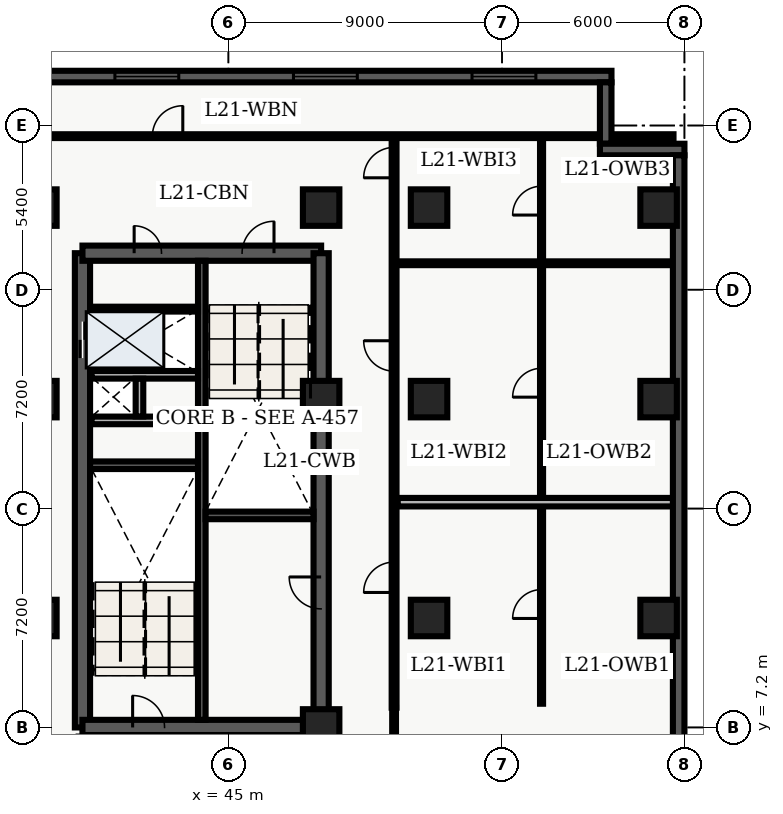
"""IFC4 building model, lengths in metres.
Left out: names, types, materials, properties, quantities, classifications, styles, units other than length and angle.
Written with IfcOpenShell. Run it as: python <this file> out.ifc"""

import sys

from ifc_helpers import new_model, entity, si_unit, converted_unit, direction, frame, origin_with_axes, origin_2d_with_axis, place, context, subcontext, project, spatial, polyline, rectangle, outline, extrude, element, fill, save


model = new_model("IFC4")
c1 = context("Model", 3, precision=1e-05, world=origin_with_axes(), true_north=direction((0.0, 1.0)))
c2 = subcontext(c1, "Body", "Model", "MODEL_VIEW")
j1 = project(units=[si_unit("LENGTHUNIT", "METRE"), converted_unit("PLANEANGLEUNIT", "DEGREE", entity("IfcPlaneAngleMeasure", 0.017), si_unit("PLANEANGLEUNIT", "RADIAN"), dimensions=[0, 0, 0, 0, 0, 0, 0])], contexts=[c1])
p1 = place(None, origin_with_axes())
s1 = spatial("IfcSite", under=j1, at=p1, CompositionType="ELEMENT")
p2 = place(p1, origin_with_axes())
s2 = spatial("IfcBuilding", under=s1, at=p2, CompositionType="ELEMENT")
p3 = place(p2, frame((0.0, 0.0, 89.1), z_axis=(0.0, 0.0, 1.0), x_axis=(1.0, 0.0, 0.0)))
s3 = spatial("IfcBuildingStorey", under=s2, at=p3, CompositionType="ELEMENT", Elevation=89.1)
p4 = place(p3, frame((40.2, 7.2, 0.0), z_axis=(0.0, 0.0, 1.0), x_axis=(0.0, 1.0, 0.0)))
e1 = element("IfcWall", 1, at=p4, inside=s3, PredefinedType="SHEAR", context=c2, shape_type="SweptSolid", body=[
    extrude(outline(polyline([(0.0, -0.25), (15.6, -0.25), (15.6, 0.25), (0.0, 0.25), (0.0, -0.25)])), origin_with_axes(), (0.0, 0.0, 1.0), 3.66),
])
p5 = place(p4, frame((12.75, 0.0, 0.0), z_axis=(0.0, 0.0, 1.0), x_axis=(1.0, 0.0, 0.0)))
e2 = element("IfcOpeningElement", 2, at=p5, cuts=e1, PredefinedType="OPENING", context=c2, shape_type="SweptSolid", body=[
    extrude(rectangle(XDim=1.2, YDim=0.52, at=origin_2d_with_axis()), origin_with_axes(), (0.0, 0.0, 1.0), 2.15),
])
p6 = place(p3, frame((40.2, 7.2, 0.0), z_axis=(0.0, 0.0, 1.0), x_axis=(1.0, 0.0, 0.0)))
e3 = element("IfcWall", 3, at=p6, inside=s3, PredefinedType="SHEAR", context=c2, shape_type="SweptSolid", body=[
    extrude(outline(polyline([(0.0, -0.25), (7.85, -0.25), (7.85, 0.25), (0.0, 0.25), (0.0, -0.25)])), origin_with_axes(), (0.0, 0.0, 1.0), 3.66),
])
p7 = place(p6, frame((2.175, 0.0, 0.0), z_axis=(0.0, 0.0, 1.0), x_axis=(1.0, 0.0, 0.0)))
e4 = element("IfcOpeningElement", 4, at=p7, cuts=e3, PredefinedType="OPENING", context=c2, shape_type="SweptSolid", body=[
    extrude(rectangle(XDim=1.05, YDim=0.52, at=origin_2d_with_axis()), origin_with_axes(), (0.0, 0.0, 1.0), 2.15),
])
p8 = place(p3, frame((40.2, 22.8, 0.0), z_axis=(0.0, 0.0, 1.0), x_axis=(1.0, 0.0, 0.0)))
e5 = element("IfcWall", 5, at=p8, inside=s3, PredefinedType="SHEAR", context=c2, shape_type="SweptSolid", body=[
    extrude(outline(polyline([(0.0, -0.25), (7.85, -0.25), (7.85, 0.25), (0.0, 0.25), (0.0, -0.25)])), origin_with_axes(), (0.0, 0.0, 1.0), 3.66),
])
p9 = place(p8, frame((5.775, 0.0, 0.0), z_axis=(0.0, 0.0, 1.0), x_axis=(1.0, 0.0, 0.0)))
e6 = element("IfcOpeningElement", 6, at=p9, cuts=e5, PredefinedType="OPENING", context=c2, shape_type="SweptSolid", body=[
    extrude(rectangle(XDim=1.05, YDim=0.52, at=origin_2d_with_axis()), origin_with_axes(), (0.0, 0.0, 1.0), 2.15),
])
p10 = place(p8, frame((2.15, 0.0, 0.0), z_axis=(0.0, 0.0, 1.0), x_axis=(1.0, 0.0, 0.0)))
e7 = element("IfcOpeningElement", 7, at=p10, cuts=e5, PredefinedType="OPENING", context=c2, shape_type="SweptSolid", body=[
    extrude(rectangle(XDim=0.9, YDim=0.52, at=origin_2d_with_axis()), origin_with_axes(), (0.0, 0.0, 1.0), 2.15),
])
p11 = place(p3, frame((48.05, 7.2, 0.0), z_axis=(0.0, 0.0, 1.0), x_axis=(0.0, 1.0, 0.0)))
e8 = element("IfcWall", 8, at=p11, inside=s3, PredefinedType="SHEAR", context=c2, shape_type="SweptSolid", body=[
    extrude(outline(polyline([(0.0, -0.25), (15.6, -0.25), (15.6, 0.25), (0.0, 0.25), (0.0, -0.25)])), origin_with_axes(), (0.0, 0.0, 1.0), 3.66),
])
p12 = place(p11, frame((4.425, 0.0, 0.0), z_axis=(0.0, 0.0, 1.0), x_axis=(1.0, 0.0, 0.0)))
e9 = element("IfcOpeningElement", 9, at=p12, cuts=e8, PredefinedType="OPENING", context=c2, shape_type="SweptSolid", body=[
    extrude(rectangle(XDim=1.05, YDim=0.52, at=origin_2d_with_axis()), origin_with_axes(), (0.0, 0.0, 1.0), 2.15),
])
p13 = place(p3, frame((44.125, 7.45, 0.0), z_axis=(0.0, 0.0, 1.0), x_axis=(0.0, 1.0, 0.0)))
e10 = element("IfcWall", 10, at=p13, inside=s3, PredefinedType="SHEAR", context=c2, shape_type="SweptSolid", body=[
    extrude(outline(polyline([(0.0, -0.125), (15.1, -0.125), (15.1, 0.125), (0.0, 0.125), (0.0, -0.125)])), origin_with_axes(), (0.0, 0.0, 1.0), 3.66),
])
for number, where, z_axis, x_axis in (
    (11, (40.45, 15.825, 0.0), (0.0, 0.0, 1.0), (1.0, 0.0, 0.0)),
    (12, (44.25, 14.175, 0.0), (0.0, 0.0, 1.0), (1.0, 0.0, 0.0)),
):
    element("IfcWall", number, at=place(p3, frame(where, z_axis=z_axis, x_axis=x_axis)), inside=s3, PredefinedType="SHEAR", context=c2, shape_type="SweptSolid", body=[
        extrude(outline(polyline([(0.0, -0.125), (3.55, -0.125), (3.55, 0.125), (0.0, 0.125), (0.0, -0.125)])), origin_with_axes(), (0.0, 0.0, 1.0), 3.66),
    ])
for number, where, z_axis, x_axis in (
    (13, (40.5, 17.3, 0.0), (0.0, 0.0, 1.0), (1.0, 0.0, 0.0)),
    (14, (40.5, 18.8, 0.0), (0.0, 0.0, 1.0), (1.0, 0.0, 0.0)),
):
    element("IfcWall", number, at=place(p3, frame(where, z_axis=z_axis, x_axis=x_axis)), inside=s3, PredefinedType="SOLIDWALL", context=c2, shape_type="SweptSolid", body=[
        extrude(outline(polyline([(0.0, -0.125), (3.5, -0.125), (3.5, 0.125), (0.0, 0.125), (0.0, -0.125)])), origin_with_axes(), (0.0, 0.0, 1.0), 2.7),
    ])
p14 = place(p3, frame((42.075, 17.43, 0.0), z_axis=(0.0, 0.0, 1.0), x_axis=(0.0, 1.0, 0.0)))
e15 = element("IfcWall", 15, at=p14, inside=s3, PredefinedType="SOLIDWALL", context=c2, shape_type="SweptSolid", body=[
    extrude(outline(polyline([(0.0, -0.125), (1.24, -0.125), (1.24, 0.125), (0.0, 0.125), (0.0, -0.125)])), origin_with_axes(), (0.0, 0.0, 1.0), 2.7),
])
for number, where, z_axis, x_axis in (
    (16, (38.75, 10.8, 0.0), (0.0, 0.0, 1.0), (1.0, 0.0, 0.0)),
    (17, (38.75, 18.0, 0.0), (0.0, 0.0, 1.0), (1.0, 0.0, 0.0)),
    (18, (38.75, 24.3, 0.0), (0.0, 0.0, 1.0), (1.0, 0.0, 0.0)),
    (19, (48.05, 7.2, 0.0), (0.0, 0.0, 1.0), (1.0, 0.0, 0.0)),
    (20, (48.05, 18.0, 0.0), (0.0, 0.0, 1.0), (1.0, 0.0, 0.0)),
    (21, (48.05, 24.3, 0.0), (0.0, 0.0, 1.0), (1.0, 0.0, 0.0)),
    (22, (51.6, 10.8, 0.0), (0.0, 0.0, 1.0), (1.0, 0.0, 0.0)),
    (23, (51.6, 18.0, 0.0), (0.0, 0.0, 1.0), (1.0, 0.0, 0.0)),
    (24, (51.6, 24.3, 0.0), (0.0, 0.0, 1.0), (1.0, 0.0, 0.0)),
    (25, (59.15, 10.8, 0.0), (0.0, 0.0, 1.0), (1.0, 0.0, 0.0)),
    (26, (59.15, 18.0, 0.0), (0.0, 0.0, 1.0), (1.0, 0.0, 0.0)),
    (27, (59.15, 24.3, 0.0), (0.0, 0.0, 1.0), (1.0, 0.0, 0.0)),
):
    element("IfcColumn", number, at=place(p3, frame(where, z_axis=z_axis, x_axis=x_axis)), inside=s3, PredefinedType="COLUMN", context=c2, shape_type="SweptSolid", body=[
        extrude(rectangle(XDim=1.2, YDim=1.2, at=origin_2d_with_axis()), origin_with_axes(), (0.0, 0.0, 1.0), 3.9),
    ])
p15 = place(p3, frame((40.5, 20.96, 0.0), z_axis=(0.0, 0.0, 1.0), x_axis=(1.0, 0.0, 0.0)))
e28 = element("IfcWall", 28, at=p15, inside=s3, PredefinedType="PARTITIONING", context=c2, shape_type="SweptSolid", body=[
    extrude(outline(polyline([(0.0, -0.08), (3.5, -0.08), (3.5, 0.08), (0.0, 0.08), (0.0, -0.08)])), origin_with_axes(), (0.0, 0.0, 1.0), 2.7),
])
p16 = place(p3, frame((50.45, 7.85, 0.0), z_axis=(0.0, 0.0, 1.0), x_axis=(0.0, 1.0, 0.0)))
e29 = element("IfcWall", 29, at=p16, inside=s3, PredefinedType="PARTITIONING", context=c2, shape_type="SweptSolid", body=[
    extrude(outline(polyline([(0.0, -0.08), (18.8, -0.08), (18.8, 0.08), (0.0, 0.08), (0.0, -0.08)])), origin_with_axes(), (0.0, 0.0, 1.0), 2.7),
])
p17 = place(p16, frame((4.29, 0.0, 0.0), z_axis=(0.0, 0.0, 1.0), x_axis=(1.0, 0.0, 0.0)))
e30 = element("IfcOpeningElement", 30, at=p17, cuts=e29, PredefinedType="OPENING", context=c2, shape_type="SweptSolid", body=[
    extrude(rectangle(XDim=1.0, YDim=0.18, at=origin_2d_with_axis()), origin_with_axes(), (0.0, 0.0, 1.0), 2.15),
])
p18 = place(p16, frame((11.57, 0.0, 0.0), z_axis=(0.0, 0.0, 1.0), x_axis=(1.0, 0.0, 0.0)))
e31 = element("IfcOpeningElement", 31, at=p18, cuts=e29, PredefinedType="OPENING", context=c2, shape_type="SweptSolid", body=[
    extrude(rectangle(XDim=1.0, YDim=0.18, at=origin_2d_with_axis()), origin_with_axes(), (0.0, 0.0, 1.0), 2.15),
])
p19 = place(p16, frame((17.93, 0.0, 0.0), z_axis=(0.0, 0.0, 1.0), x_axis=(1.0, 0.0, 0.0)))
e32 = element("IfcOpeningElement", 32, at=p19, cuts=e29, PredefinedType="OPENING", context=c2, shape_type="SweptSolid", body=[
    extrude(rectangle(XDim=1.0, YDim=0.18, at=origin_2d_with_axis()), origin_with_axes(), (0.0, 0.0, 1.0), 2.15),
])
p20 = place(p3, frame((38.76, 26.65, 0.0), z_axis=(0.0, 0.0, 1.0), x_axis=(1.0, 0.0, 0.0)))
e33 = element("IfcWall", 33, at=p20, inside=s3, PredefinedType="PARTITIONING", context=c2, shape_type="SweptSolid", body=[
    extrude(outline(polyline([(0.0, -0.062), (20.88, -0.062), (20.88, 0.062), (0.0, 0.062), (0.0, -0.062)])), origin_with_axes(), (0.0, 0.0, 1.0), 2.7),
])
p21 = place(p20, frame((4.24, 0.0, 0.0), z_axis=(0.0, 0.0, 1.0), x_axis=(1.0, 0.0, 0.0)))
e34 = element("IfcOpeningElement", 34, at=p21, cuts=e33, PredefinedType="OPENING", context=c2, shape_type="SweptSolid", body=[
    extrude(rectangle(XDim=1.0, YDim=0.145, at=origin_2d_with_axis()), origin_with_axes(), (0.0, 0.0, 1.0), 2.15),
])
p22 = place(p3, frame((50.45, 0.36, 0.0), z_axis=(0.0, 0.0, 1.0), x_axis=(0.0, 1.0, 0.0)))
e35 = element("IfcWall", 35, at=p22, inside=s3, PredefinedType="PARTITIONING", context=c2, shape_type="SweptSolid", body=[
    extrude(outline(polyline([(0.0, -0.062), (7.49, -0.062), (7.49, 0.062), (0.0, 0.062), (0.0, -0.062)])), origin_with_axes(), (0.0, 0.0, 1.0), 2.7),
])
p23 = place(p22, frame((5.1, 0.0, 0.0), z_axis=(0.0, 0.0, 1.0), x_axis=(1.0, 0.0, 0.0)))
e36 = element("IfcOpeningElement", 36, at=p23, cuts=e35, PredefinedType="OPENING", context=c2, shape_type="SweptSolid", body=[
    extrude(rectangle(XDim=1.0, YDim=0.145, at=origin_2d_with_axis()), origin_with_axes(), (0.0, 0.0, 1.0), 2.15),
])
p24 = place(p3, frame((55.3, 7.98, 0.0), z_axis=(0.0, 0.0, 1.0), x_axis=(0.0, 1.0, 0.0)))
e37 = element("IfcWall", 37, at=p24, inside=s3, PredefinedType="PARTITIONING", context=c2, shape_type="SweptSolid", body=[
    extrude(outline(polyline([(0.0, -0.05), (18.54, -0.05), (18.54, 0.05), (0.0, 0.05), (0.0, -0.05)])), origin_with_axes(), (0.0, 0.0, 1.0), 2.7),
])
p25 = place(p24, frame((3.28, 0.0, 0.0), z_axis=(0.0, 0.0, 1.0), x_axis=(1.0, 0.0, 0.0)))
e38 = element("IfcOpeningElement", 38, at=p25, cuts=e37, PredefinedType="OPENING", context=c2, shape_type="SweptSolid", body=[
    extrude(rectangle(XDim=0.95, YDim=0.12, at=origin_2d_with_axis()), origin_with_axes(), (0.0, 0.0, 1.0), 2.15),
])
p26 = place(p24, frame((10.559, 0.0, 0.0), z_axis=(0.0, 0.0, 1.0), x_axis=(1.0, 0.0, 0.0)))
e39 = element("IfcOpeningElement", 39, at=p26, cuts=e37, PredefinedType="OPENING", context=c2, shape_type="SweptSolid", body=[
    extrude(rectangle(XDim=0.95, YDim=0.12, at=origin_2d_with_axis()), origin_with_axes(), (0.0, 0.0, 1.0), 2.15),
])
p27 = place(p24, frame((16.549, 0.0, 0.0), z_axis=(0.0, 0.0, 1.0), x_axis=(1.0, 0.0, 0.0)))
e40 = element("IfcOpeningElement", 40, at=p27, cuts=e37, PredefinedType="OPENING", context=c2, shape_type="SweptSolid", body=[
    extrude(rectangle(XDim=0.95, YDim=0.12, at=origin_2d_with_axis()), origin_with_axes(), (0.0, 0.0, 1.0), 2.15),
])
p28 = place(p3, frame((50.57, 14.61, 0.0), z_axis=(0.0, 0.0, 1.0), x_axis=(1.0, 0.0, 0.0)))
e41 = element("IfcWall", 41, at=p28, inside=s3, PredefinedType="PARTITIONING", context=c2, shape_type="SweptSolid", body=[
    extrude(outline(polyline([(0.0, -0.14), (9.055, -0.14), (9.055, 0.14), (0.0, 0.14), (0.0, -0.14)])), origin_with_axes(), (0.0, 0.0, 1.0), 2.7),
])
p29 = place(p3, frame((50.57, 22.469, 0.0), z_axis=(0.0, 0.0, 1.0), x_axis=(1.0, 0.0, 0.0)))
e42 = element("IfcWall", 42, at=p29, inside=s3, PredefinedType="PARTITIONING", context=c2, shape_type="SweptSolid", body=[
    extrude(outline(polyline([(0.0, -0.062), (9.055, -0.062), (9.055, 0.062), (0.0, 0.062), (0.0, -0.062)])), origin_with_axes(), (0.0, 0.0, 1.0), 2.7),
])
p30 = place(p3, frame((38.78, 28.61, 0.0), z_axis=(0.0, 0.0, 1.0), x_axis=(1.0, 0.0, 0.0)))
e43 = element("IfcWall", 43, at=p30, inside=s3, PredefinedType="SOLIDWALL", context=c2, shape_type="SweptSolid", body=[
    extrude(outline(polyline([(0.0, -0.19), (18.82, -0.19), (18.82, 0.19), (0.0, 0.19), (0.0, -0.19)])), origin_with_axes(), (0.0, 0.0, 1.0), 3.66),
])
p31 = place(p30, frame((3.537, 0.0, 0.45), z_axis=(0.0, 0.0, 1.0), x_axis=(1.0, 0.0, 0.0)))
e44 = element("IfcOpeningElement", 44, at=p31, cuts=e43, PredefinedType="OPENING", context=c2, shape_type="SweptSolid", body=[
    extrude(rectangle(XDim=2.1, YDim=0.4, at=origin_2d_with_axis()), origin_with_axes(), (0.0, 0.0, 1.0), 2.2),
])
p32 = place(p30, frame((9.41, 0.0, 0.45), z_axis=(0.0, 0.0, 1.0), x_axis=(1.0, 0.0, 0.0)))
e45 = element("IfcOpeningElement", 45, at=p32, cuts=e43, PredefinedType="OPENING", context=c2, shape_type="SweptSolid", body=[
    extrude(rectangle(XDim=2.1, YDim=0.4, at=origin_2d_with_axis()), origin_with_axes(), (0.0, 0.0, 1.0), 2.2),
])
p33 = place(p30, frame((15.283, 0.0, 0.45), z_axis=(0.0, 0.0, 1.0), x_axis=(1.0, 0.0, 0.0)))
e46 = element("IfcOpeningElement", 46, at=p33, cuts=e43, PredefinedType="OPENING", context=c2, shape_type="SweptSolid", body=[
    extrude(rectangle(XDim=2.1, YDim=0.4, at=origin_2d_with_axis()), origin_with_axes(), (0.0, 0.0, 1.0), 2.2),
])
p34 = place(p3, frame((57.41, 28.42, 0.0), z_axis=(0.0, 0.0, 1.0), x_axis=(0.0, -1.0, 0.0)))
e47 = element("IfcWall", 47, at=p34, inside=s3, PredefinedType="SOLIDWALL", context=c2, shape_type="SweptSolid", body=[
    extrude(outline(polyline([(0.0, -0.19), (2.02, -0.19), (2.02, 0.19), (0.0, 0.19), (0.0, -0.19)])), origin_with_axes(), (0.0, 0.0, 1.0), 3.66),
])
p35 = place(p3, frame((57.22, 26.21, 0.0), z_axis=(0.0, 0.0, 1.0), x_axis=(1.0, 0.0, 0.0)))
e48 = element("IfcWall", 48, at=p35, inside=s3, PredefinedType="SOLIDWALL", context=c2, shape_type="SweptSolid", body=[
    extrude(outline(polyline([(0.0, -0.19), (2.78, -0.19), (2.78, 0.19), (0.0, 0.19), (0.0, -0.19)])), origin_with_axes(), (0.0, 0.0, 1.0), 3.66),
])
p36 = place(p3, frame((59.81, 26.02, 0.0), z_axis=(0.0, 0.0, 1.0), x_axis=(0.0, -1.0, 0.0)))
e49 = element("IfcWall", 49, at=p36, inside=s3, PredefinedType="SOLIDWALL", context=c2, shape_type="SweptSolid", body=[
    extrude(outline(polyline([(0.0, -0.19), (23.62, -0.19), (23.62, 0.19), (0.0, 0.19), (0.0, -0.19)])), origin_with_axes(), (0.0, 0.0, 1.0), 3.66),
])
p37 = place(p36, frame((20.218, 0.0, 0.45), z_axis=(0.0, 0.0, 1.0), x_axis=(1.0, 0.0, 0.0)))
e50 = element("IfcOpeningElement", 50, at=p37, cuts=e49, PredefinedType="OPENING", context=c2, shape_type="SweptSolid", body=[
    extrude(rectangle(XDim=2.1, YDim=0.4, at=origin_2d_with_axis()), origin_with_axes(), (0.0, 0.0, 1.0), 2.2),
])
p38 = place(p4, frame((12.75, 0.0, 0.0), z_axis=(0.0, 0.0, 1.0), x_axis=(1.0, 0.0, 0.0)))
e51 = element("IfcDoor", 51, at=p38, inside=s3, OperationType="DOUBLE_DOOR_SLIDING", PredefinedType="DOOR", context=c2, shape_type="SweptSolid", body=[
    extrude(rectangle(XDim=1.2, YDim=0.09, at=origin_2d_with_axis()), origin_with_axes(), (0.0, 0.0, 1.0), 2.15),
])
fill(e2, e51)
p39 = place(p6, frame((2.175, 0.0, 0.0), z_axis=(0.0, 0.0, 1.0), x_axis=(1.0, 0.0, 0.0)))
e52 = element("IfcDoor", 52, at=p39, inside=s3, OperationType="SINGLE_SWING_LEFT", PredefinedType="DOOR", context=c2, shape_type="SweptSolid", body=[
    extrude(rectangle(XDim=1.05, YDim=0.09, at=origin_2d_with_axis()), origin_with_axes(), (0.0, 0.0, 1.0), 2.15),
])
fill(e4, e52)
p40 = place(p8, frame((5.775, 0.0, 0.0), z_axis=(0.0, 0.0, 1.0), x_axis=(1.0, 0.0, 0.0)))
e53 = element("IfcDoor", 53, at=p40, inside=s3, OperationType="SINGLE_SWING_RIGHT", PredefinedType="DOOR", context=c2, shape_type="SweptSolid", body=[
    extrude(rectangle(XDim=1.05, YDim=0.09, at=origin_2d_with_axis()), origin_with_axes(), (0.0, 0.0, 1.0), 2.15),
])
fill(e6, e53)
p41 = place(p8, frame((2.15, 0.0, 0.0), z_axis=(0.0, 0.0, 1.0), x_axis=(1.0, 0.0, 0.0)))
e54 = element("IfcDoor", 54, at=p41, inside=s3, OperationType="SINGLE_SWING_LEFT", PredefinedType="DOOR", context=c2, shape_type="SweptSolid", body=[
    extrude(rectangle(XDim=0.9, YDim=0.09, at=origin_2d_with_axis()), origin_with_axes(), (0.0, 0.0, 1.0), 2.15),
])
fill(e7, e54)
p42 = place(p11, frame((4.425, 0.0, 0.0), z_axis=(0.0, 0.0, 1.0), x_axis=(1.0, 0.0, 0.0)))
e55 = element("IfcDoor", 55, at=p42, inside=s3, OperationType="SINGLE_SWING_RIGHT", PredefinedType="DOOR", context=c2, shape_type="SweptSolid", body=[
    extrude(rectangle(XDim=1.05, YDim=0.09, at=origin_2d_with_axis()), origin_with_axes(), (0.0, 0.0, 1.0), 2.15),
])
fill(e9, e55)
p43 = place(p20, frame((4.24, 0.0, 0.0), z_axis=(0.0, 0.0, 1.0), x_axis=(1.0, 0.0, 0.0)))
e56 = element("IfcDoor", 56, at=p43, inside=s3, OperationType="SINGLE_SWING_RIGHT", PredefinedType="DOOR", context=c2, shape_type="SweptSolid", body=[
    extrude(rectangle(XDim=1.0, YDim=0.075, at=origin_2d_with_axis()), origin_with_axes(), (0.0, 0.0, 1.0), 2.15),
])
fill(e34, e56)
p44 = place(p24, frame((3.28, 0.0, 0.0), z_axis=(0.0, 0.0, 1.0), x_axis=(1.0, 0.0, 0.0)))
e57 = element("IfcDoor", 57, at=p44, inside=s3, OperationType="SINGLE_SWING_LEFT", PredefinedType="DOOR", context=c2, shape_type="SweptSolid", body=[
    extrude(rectangle(XDim=0.95, YDim=0.06, at=origin_2d_with_axis()), origin_with_axes(), (0.0, 0.0, 1.0), 2.15),
])
fill(e38, e57)
p45 = place(p16, frame((4.29, 0.0, 0.0), z_axis=(0.0, 0.0, 1.0), x_axis=(1.0, 0.0, 0.0)))
e58 = element("IfcDoor", 58, at=p45, inside=s3, OperationType="SINGLE_SWING_LEFT", PredefinedType="DOOR", context=c2, shape_type="SweptSolid", body=[
    extrude(rectangle(XDim=1.0, YDim=0.09, at=origin_2d_with_axis()), origin_with_axes(), (0.0, 0.0, 1.0), 2.15),
])
fill(e30, e58)
p46 = place(p24, frame((10.559, 0.0, 0.0), z_axis=(0.0, 0.0, 1.0), x_axis=(1.0, 0.0, 0.0)))
e59 = element("IfcDoor", 59, at=p46, inside=s3, OperationType="SINGLE_SWING_LEFT", PredefinedType="DOOR", context=c2, shape_type="SweptSolid", body=[
    extrude(rectangle(XDim=0.95, YDim=0.06, at=origin_2d_with_axis()), origin_with_axes(), (0.0, 0.0, 1.0), 2.15),
])
fill(e39, e59)
p47 = place(p16, frame((11.57, 0.0, 0.0), z_axis=(0.0, 0.0, 1.0), x_axis=(1.0, 0.0, 0.0)))
e60 = element("IfcDoor", 60, at=p47, inside=s3, OperationType="SINGLE_SWING_RIGHT", PredefinedType="DOOR", context=c2, shape_type="SweptSolid", body=[
    extrude(rectangle(XDim=1.0, YDim=0.09, at=origin_2d_with_axis()), origin_with_axes(), (0.0, 0.0, 1.0), 2.15),
])
fill(e31, e60)
p48 = place(p24, frame((16.549, 0.0, 0.0), z_axis=(0.0, 0.0, 1.0), x_axis=(1.0, 0.0, 0.0)))
e61 = element("IfcDoor", 61, at=p48, inside=s3, OperationType="SINGLE_SWING_LEFT", PredefinedType="DOOR", context=c2, shape_type="SweptSolid", body=[
    extrude(rectangle(XDim=0.95, YDim=0.06, at=origin_2d_with_axis()), origin_with_axes(), (0.0, 0.0, 1.0), 2.15),
])
fill(e40, e61)
p49 = place(p16, frame((17.93, 0.0, 0.0), z_axis=(0.0, 0.0, 1.0), x_axis=(1.0, 0.0, 0.0)))
e62 = element("IfcDoor", 62, at=p49, inside=s3, OperationType="SINGLE_SWING_LEFT", PredefinedType="DOOR", context=c2, shape_type="SweptSolid", body=[
    extrude(rectangle(XDim=1.0, YDim=0.09, at=origin_2d_with_axis()), origin_with_axes(), (0.0, 0.0, 1.0), 2.15),
])
fill(e32, e62)
p50 = place(p30, frame((3.537, 0.0, 0.45), z_axis=(0.0, 0.0, 1.0), x_axis=(1.0, 0.0, 0.0)))
e63 = element("IfcWindow", 63, at=p50, inside=s3, PredefinedType="WINDOW", context=c2, shape_type="SweptSolid", body=[
    extrude(rectangle(XDim=2.1, YDim=0.09, at=origin_2d_with_axis()), origin_with_axes(), (0.0, 0.0, 1.0), 2.2),
])
fill(e44, e63)
p51 = place(p30, frame((9.41, 0.0, 0.45), z_axis=(0.0, 0.0, 1.0), x_axis=(1.0, 0.0, 0.0)))
e64 = element("IfcWindow", 64, at=p51, inside=s3, PredefinedType="WINDOW", context=c2, shape_type="SweptSolid", body=[
    extrude(rectangle(XDim=2.1, YDim=0.09, at=origin_2d_with_axis()), origin_with_axes(), (0.0, 0.0, 1.0), 2.2),
])
fill(e45, e64)
p52 = place(p30, frame((15.283, 0.0, 0.45), z_axis=(0.0, 0.0, 1.0), x_axis=(1.0, 0.0, 0.0)))
e65 = element("IfcWindow", 65, at=p52, inside=s3, PredefinedType="WINDOW", context=c2, shape_type="SweptSolid", body=[
    extrude(rectangle(XDim=2.1, YDim=0.09, at=origin_2d_with_axis()), origin_with_axes(), (0.0, 0.0, 1.0), 2.2),
])
fill(e46, e65)
save(model, sys.argv[1])
